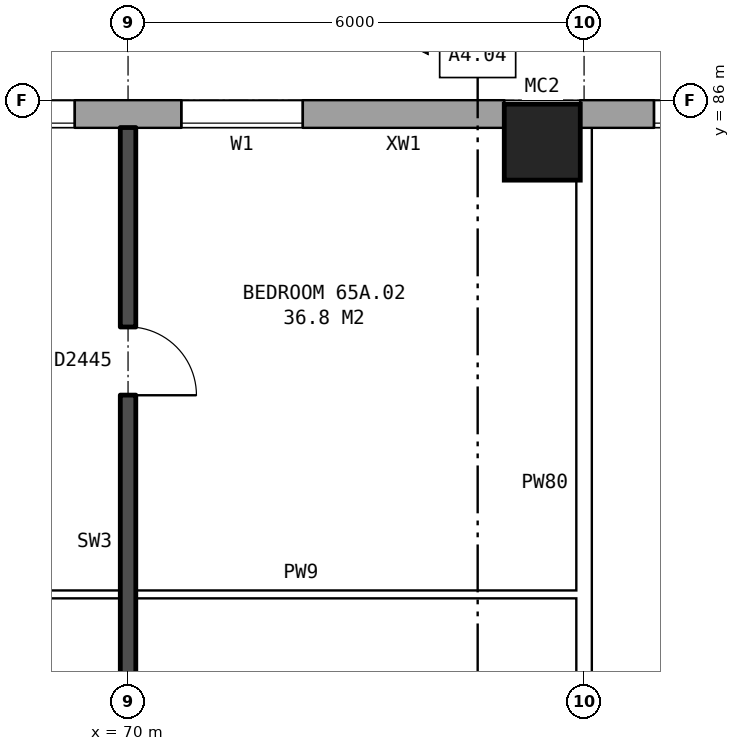
"""IFC4 building model, lengths in metres.
Left out: names, types, materials, properties, quantities, classifications, styles, units other than length and angle.
Written with IfcOpenShell. Run it as: python <this file> out.ifc"""

import sys

from ifc_helpers import new_model, si_unit, direction, frame, frame_2d, origin, origin_2d, place, context, subcontext, project, spatial, rectangle, hollow_rectangle, extrude, element, fill, save


model = new_model("IFC4")
c1 = context("Model", 3, precision=1e-05, world=origin(), true_north=direction((0.0, 1.0)))
c2 = subcontext(c1, "Body", "Model", "MODEL_VIEW")
j1 = project(units=[si_unit("LENGTHUNIT", "METRE"), si_unit("PLANEANGLEUNIT", "RADIAN")], contexts=[c1])
p1 = place(None, origin())
s1 = spatial("IfcSite", under=j1, at=p1, CompositionType="ELEMENT")
p2 = place(p1, origin())
s2 = spatial("IfcBuilding", under=s1, at=p2, CompositionType="ELEMENT")
p3 = place(p2, frame((0.0, 0.0, 230.7)))
s3 = spatial("IfcBuildingStorey", under=s2, at=p3, CompositionType="ELEMENT", Elevation=230.7)
p4 = place(p3, frame((75.45, 85.45, 0.0), z_axis=(0.0, 0.0, 1.0), x_axis=(1.0, 0.0, 0.0)))
e1 = element("IfcColumn", 1, at=p4, inside=s3, PredefinedType="COLUMN", context=c2, shape_type="SweptSolid", body=[
    extrude(hollow_rectangle(XDim=1.0, YDim=1.0, WallThickness=0.055, at=origin_2d()), origin(), (0.0, 0.0, 1.0), 3.1),
])
p5 = place(p3, frame((131.05, 85.82, 0.0), z_axis=(0.0, 0.0, 1.0), x_axis=(-1.0, 0.0, 0.0)))
e2 = element("IfcWall", 2, at=p5, inside=s3, PredefinedType="STANDARD", context=c2, shape_type="SweptSolid", body=[
    extrude(rectangle(XDim=55.1, YDim=0.36, at=frame_2d((27.55, 0.0))), origin(), (0.0, 0.0, 1.0), 2.85),
])
p6 = place(p5, frame((0.969, 0.0, 0.8)))
e3 = element("IfcOpeningElement", 3, at=p6, cuts=e2, PredefinedType="OPENING", context=c2, shape_type="SweptSolid", body=[
    extrude(rectangle(XDim=1.6, YDim=1.8, at=frame_2d((0.8, 0.9))), frame((0.0, 0.19, 0.0), z_axis=(0.0, -1.0, 0.0), x_axis=(1.0, 0.0, 0.0)), (0.0, 0.0, 1.0), 0.38),
])
p7 = place(p5, frame((4.406, 0.0, 0.8)))
e4 = element("IfcOpeningElement", 4, at=p7, cuts=e2, PredefinedType="OPENING", context=c2, shape_type="SweptSolid", body=[
    extrude(rectangle(XDim=1.6, YDim=1.8, at=frame_2d((0.8, 0.9))), frame((0.0, 0.19, 0.0), z_axis=(0.0, -1.0, 0.0), x_axis=(1.0, 0.0, 0.0)), (0.0, 0.0, 1.0), 0.38),
])
p8 = place(p5, frame((7.844, 0.0, 0.8)))
e5 = element("IfcOpeningElement", 5, at=p8, cuts=e2, PredefinedType="OPENING", context=c2, shape_type="SweptSolid", body=[
    extrude(rectangle(XDim=1.6, YDim=1.8, at=frame_2d((0.8, 0.9))), frame((0.0, 0.19, 0.0), z_axis=(0.0, -1.0, 0.0), x_axis=(1.0, 0.0, 0.0)), (0.0, 0.0, 1.0), 0.38),
])
p9 = place(p5, frame((11.281, 0.0, 0.8)))
e6 = element("IfcOpeningElement", 6, at=p9, cuts=e2, PredefinedType="OPENING", context=c2, shape_type="SweptSolid", body=[
    extrude(rectangle(XDim=1.6, YDim=1.8, at=frame_2d((0.8, 0.9))), frame((0.0, 0.19, 0.0), z_axis=(0.0, -1.0, 0.0), x_axis=(1.0, 0.0, 0.0)), (0.0, 0.0, 1.0), 0.38),
])
p10 = place(p5, frame((14.719, 0.0, 0.8)))
e7 = element("IfcOpeningElement", 7, at=p10, cuts=e2, PredefinedType="OPENING", context=c2, shape_type="SweptSolid", body=[
    extrude(rectangle(XDim=1.6, YDim=1.8, at=frame_2d((0.8, 0.9))), frame((0.0, 0.19, 0.0), z_axis=(0.0, -1.0, 0.0), x_axis=(1.0, 0.0, 0.0)), (0.0, 0.0, 1.0), 0.38),
])
p11 = place(p5, frame((18.156, 0.0, 0.8)))
e8 = element("IfcOpeningElement", 8, at=p11, cuts=e2, PredefinedType="OPENING", context=c2, shape_type="SweptSolid", body=[
    extrude(rectangle(XDim=1.6, YDim=1.8, at=frame_2d((0.8, 0.9))), frame((0.0, 0.19, 0.0), z_axis=(0.0, -1.0, 0.0), x_axis=(1.0, 0.0, 0.0)), (0.0, 0.0, 1.0), 0.38),
])
p12 = place(p5, frame((21.594, 0.0, 0.8)))
e9 = element("IfcOpeningElement", 9, at=p12, cuts=e2, PredefinedType="OPENING", context=c2, shape_type="SweptSolid", body=[
    extrude(rectangle(XDim=1.6, YDim=1.8, at=frame_2d((0.8, 0.9))), frame((0.0, 0.19, 0.0), z_axis=(0.0, -1.0, 0.0), x_axis=(1.0, 0.0, 0.0)), (0.0, 0.0, 1.0), 0.38),
])
p13 = place(p5, frame((25.031, 0.0, 0.8)))
e10 = element("IfcOpeningElement", 10, at=p13, cuts=e2, PredefinedType="OPENING", context=c2, shape_type="SweptSolid", body=[
    extrude(rectangle(XDim=1.6, YDim=1.8, at=frame_2d((0.8, 0.9))), frame((0.0, 0.19, 0.0), z_axis=(0.0, -1.0, 0.0), x_axis=(1.0, 0.0, 0.0)), (0.0, 0.0, 1.0), 0.38),
])
p14 = place(p5, frame((28.469, 0.0, 0.8)))
e11 = element("IfcOpeningElement", 11, at=p14, cuts=e2, PredefinedType="OPENING", context=c2, shape_type="SweptSolid", body=[
    extrude(rectangle(XDim=1.6, YDim=1.8, at=frame_2d((0.8, 0.9))), frame((0.0, 0.19, 0.0), z_axis=(0.0, -1.0, 0.0), x_axis=(1.0, 0.0, 0.0)), (0.0, 0.0, 1.0), 0.38),
])
p15 = place(p5, frame((31.906, 0.0, 0.8)))
e12 = element("IfcOpeningElement", 12, at=p15, cuts=e2, PredefinedType="OPENING", context=c2, shape_type="SweptSolid", body=[
    extrude(rectangle(XDim=1.6, YDim=1.8, at=frame_2d((0.8, 0.9))), frame((0.0, 0.19, 0.0), z_axis=(0.0, -1.0, 0.0), x_axis=(1.0, 0.0, 0.0)), (0.0, 0.0, 1.0), 0.38),
])
p16 = place(p5, frame((35.344, 0.0, 0.8)))
e13 = element("IfcOpeningElement", 13, at=p16, cuts=e2, PredefinedType="OPENING", context=c2, shape_type="SweptSolid", body=[
    extrude(rectangle(XDim=1.6, YDim=1.8, at=frame_2d((0.8, 0.9))), frame((0.0, 0.19, 0.0), z_axis=(0.0, -1.0, 0.0), x_axis=(1.0, 0.0, 0.0)), (0.0, 0.0, 1.0), 0.38),
])
p17 = place(p5, frame((38.781, 0.0, 0.8)))
e14 = element("IfcOpeningElement", 14, at=p17, cuts=e2, PredefinedType="OPENING", context=c2, shape_type="SweptSolid", body=[
    extrude(rectangle(XDim=1.6, YDim=1.8, at=frame_2d((0.8, 0.9))), frame((0.0, 0.19, 0.0), z_axis=(0.0, -1.0, 0.0), x_axis=(1.0, 0.0, 0.0)), (0.0, 0.0, 1.0), 0.38),
])
p18 = place(p5, frame((42.219, 0.0, 0.8)))
e15 = element("IfcOpeningElement", 15, at=p18, cuts=e2, PredefinedType="OPENING", context=c2, shape_type="SweptSolid", body=[
    extrude(rectangle(XDim=1.6, YDim=1.8, at=frame_2d((0.8, 0.9))), frame((0.0, 0.19, 0.0), z_axis=(0.0, -1.0, 0.0), x_axis=(1.0, 0.0, 0.0)), (0.0, 0.0, 1.0), 0.38),
])
p19 = place(p5, frame((45.656, 0.0, 0.8)))
e16 = element("IfcOpeningElement", 16, at=p19, cuts=e2, PredefinedType="OPENING", context=c2, shape_type="SweptSolid", body=[
    extrude(rectangle(XDim=1.6, YDim=1.8, at=frame_2d((0.8, 0.9))), frame((0.0, 0.19, 0.0), z_axis=(0.0, -1.0, 0.0), x_axis=(1.0, 0.0, 0.0)), (0.0, 0.0, 1.0), 0.38),
])
p20 = place(p5, frame((49.094, 0.0, 0.8)))
e17 = element("IfcOpeningElement", 17, at=p20, cuts=e2, PredefinedType="OPENING", context=c2, shape_type="SweptSolid", body=[
    extrude(rectangle(XDim=1.6, YDim=1.8, at=frame_2d((0.8, 0.9))), frame((0.0, 0.19, 0.0), z_axis=(0.0, -1.0, 0.0), x_axis=(1.0, 0.0, 0.0)), (0.0, 0.0, 1.0), 0.38),
])
p21 = place(p5, frame((52.531, 0.0, 0.8)))
e18 = element("IfcOpeningElement", 18, at=p21, cuts=e2, PredefinedType="OPENING", context=c2, shape_type="SweptSolid", body=[
    extrude(rectangle(XDim=1.6, YDim=1.8, at=frame_2d((0.8, 0.9))), frame((0.0, 0.19, 0.0), z_axis=(0.0, -1.0, 0.0), x_axis=(1.0, 0.0, 0.0)), (0.0, 0.0, 1.0), 0.38),
])
p22 = place(p3, frame((74.95, 85.82, 0.0), z_axis=(0.0, 0.0, 1.0), x_axis=(-1.0, 0.0, 0.0)))
e19 = element("IfcWall", 19, at=p22, inside=s3, PredefinedType="STANDARD", context=c2, shape_type="SweptSolid", body=[
    extrude(rectangle(XDim=39.875, YDim=0.36, at=frame_2d((19.938, 0.0))), origin(), (0.0, 0.0, 1.0), 2.85),
])
p23 = place(p22, frame((2.65, 0.0, 0.8)))
e20 = element("IfcOpeningElement", 20, at=p23, cuts=e19, PredefinedType="OPENING", context=c2, shape_type="SweptSolid", body=[
    extrude(rectangle(XDim=1.6, YDim=1.8, at=frame_2d((0.8, 0.9))), frame((0.0, 0.19, 0.0), z_axis=(0.0, -1.0, 0.0), x_axis=(1.0, 0.0, 0.0)), (0.0, 0.0, 1.0), 0.38),
])
p24 = place(p22, frame((5.65, 0.0, 0.8)))
e21 = element("IfcOpeningElement", 21, at=p24, cuts=e19, PredefinedType="OPENING", context=c2, shape_type="SweptSolid", body=[
    extrude(rectangle(XDim=1.6, YDim=1.8, at=frame_2d((0.8, 0.9))), frame((0.0, 0.19, 0.0), z_axis=(0.0, -1.0, 0.0), x_axis=(1.0, 0.0, 0.0)), (0.0, 0.0, 1.0), 0.38),
])
p25 = place(p22, frame((8.65, 0.0, 0.8)))
e22 = element("IfcOpeningElement", 22, at=p25, cuts=e19, PredefinedType="OPENING", context=c2, shape_type="SweptSolid", body=[
    extrude(rectangle(XDim=1.6, YDim=1.8, at=frame_2d((0.8, 0.9))), frame((0.0, 0.19, 0.0), z_axis=(0.0, -1.0, 0.0), x_axis=(1.0, 0.0, 0.0)), (0.0, 0.0, 1.0), 0.38),
])
p26 = place(p22, frame((11.65, 0.0, 0.8)))
e23 = element("IfcOpeningElement", 23, at=p26, cuts=e19, PredefinedType="OPENING", context=c2, shape_type="SweptSolid", body=[
    extrude(rectangle(XDim=1.6, YDim=1.8, at=frame_2d((0.8, 0.9))), frame((0.0, 0.19, 0.0), z_axis=(0.0, -1.0, 0.0), x_axis=(1.0, 0.0, 0.0)), (0.0, 0.0, 1.0), 0.38),
])
p27 = place(p22, frame((14.65, 0.0, 0.8)))
e24 = element("IfcOpeningElement", 24, at=p27, cuts=e19, PredefinedType="OPENING", context=c2, shape_type="SweptSolid", body=[
    extrude(rectangle(XDim=1.6, YDim=1.8, at=frame_2d((0.8, 0.9))), frame((0.0, 0.19, 0.0), z_axis=(0.0, -1.0, 0.0), x_axis=(1.0, 0.0, 0.0)), (0.0, 0.0, 1.0), 0.38),
])
p28 = place(p22, frame((17.15, 0.0, 1.7)))
e25 = element("IfcOpeningElement", 25, at=p28, cuts=e19, PredefinedType="OPENING", context=c2, shape_type="SweptSolid", body=[
    extrude(rectangle(XDim=0.6, YDim=0.9, at=frame_2d((0.3, 0.45))), frame((0.0, 0.19, 0.0), z_axis=(0.0, -1.0, 0.0), x_axis=(1.0, 0.0, 0.0)), (0.0, 0.0, 1.0), 0.38),
])
p29 = place(p22, frame((20.65, 0.0, 0.8)))
e26 = element("IfcOpeningElement", 26, at=p29, cuts=e19, PredefinedType="OPENING", context=c2, shape_type="SweptSolid", body=[
    extrude(rectangle(XDim=1.6, YDim=1.8, at=frame_2d((0.8, 0.9))), frame((0.0, 0.19, 0.0), z_axis=(0.0, -1.0, 0.0), x_axis=(1.0, 0.0, 0.0)), (0.0, 0.0, 1.0), 0.38),
])
p30 = place(p22, frame((24.7, 0.0, 0.8)))
e27 = element("IfcOpeningElement", 27, at=p30, cuts=e19, PredefinedType="OPENING", context=c2, shape_type="SweptSolid", body=[
    extrude(rectangle(XDim=1.0, YDim=1.8, at=frame_2d((0.5, 0.9))), frame((0.0, 0.19, 0.0), z_axis=(0.0, -1.0, 0.0), x_axis=(1.0, 0.0, 0.0)), (0.0, 0.0, 1.0), 0.38),
])
p31 = place(p22, frame((26.65, 0.0, 0.8)))
e28 = element("IfcOpeningElement", 28, at=p31, cuts=e19, PredefinedType="OPENING", context=c2, shape_type="SweptSolid", body=[
    extrude(rectangle(XDim=1.6, YDim=1.8, at=frame_2d((0.8, 0.9))), frame((0.0, 0.19, 0.0), z_axis=(0.0, -1.0, 0.0), x_axis=(1.0, 0.0, 0.0)), (0.0, 0.0, 1.0), 0.38),
])
p32 = place(p22, frame((29.65, 0.0, 0.8)))
e29 = element("IfcOpeningElement", 29, at=p32, cuts=e19, PredefinedType="OPENING", context=c2, shape_type="SweptSolid", body=[
    extrude(rectangle(XDim=1.6, YDim=1.8, at=frame_2d((0.8, 0.9))), frame((0.0, 0.19, 0.0), z_axis=(0.0, -1.0, 0.0), x_axis=(1.0, 0.0, 0.0)), (0.0, 0.0, 1.0), 0.38),
])
p33 = place(p22, frame((32.65, 0.0, 0.8)))
e30 = element("IfcOpeningElement", 30, at=p33, cuts=e19, PredefinedType="OPENING", context=c2, shape_type="SweptSolid", body=[
    extrude(rectangle(XDim=1.6, YDim=1.8, at=frame_2d((0.8, 0.9))), frame((0.0, 0.19, 0.0), z_axis=(0.0, -1.0, 0.0), x_axis=(1.0, 0.0, 0.0)), (0.0, 0.0, 1.0), 0.38),
])
p34 = place(p22, frame((35.65, 0.0, 0.8)))
e31 = element("IfcOpeningElement", 31, at=p34, cuts=e19, PredefinedType="OPENING", context=c2, shape_type="SweptSolid", body=[
    extrude(rectangle(XDim=1.6, YDim=1.8, at=frame_2d((0.8, 0.9))), frame((0.0, 0.19, 0.0), z_axis=(0.0, -1.0, 0.0), x_axis=(1.0, 0.0, 0.0)), (0.0, 0.0, 1.0), 0.38),
])
p35 = place(p22, frame((19.1, 0.0, 0.8)))
e32 = element("IfcOpeningElement", 32, at=p35, cuts=e19, PredefinedType="OPENING", context=c2, shape_type="SweptSolid", body=[
    extrude(rectangle(XDim=0.6, YDim=1.2, at=frame_2d((0.3, 0.6))), frame((0.0, 0.19, 0.0), z_axis=(0.0, -1.0, 0.0), x_axis=(1.0, 0.0, 0.0)), (0.0, 0.0, 1.0), 0.38),
])
p36 = place(p3, frame((64.1, 79.5, 0.0), z_axis=(0.0, 0.0, 1.0), x_axis=(1.0, 0.0, 0.0)))
e33 = element("IfcWall", 33, at=p36, inside=s3, PredefinedType="PARTITIONING", context=c2, shape_type="SweptSolid", body=[
    extrude(rectangle(XDim=11.8, YDim=0.1, at=frame_2d((5.9, 0.0))), origin(), (0.0, 0.0, 1.0), 2.85),
])
p37 = place(p36, frame((3.65, 0.0, 0.0)))
e34 = element("IfcOpeningElement", 34, at=p37, cuts=e33, PredefinedType="OPENING", context=c2, shape_type="SweptSolid", body=[
    extrude(rectangle(XDim=0.9, YDim=2.1, at=frame_2d((0.45, 1.05))), frame((0.0, 0.06, 0.0), z_axis=(0.0, -1.0, 0.0), x_axis=(1.0, 0.0, 0.0)), (0.0, 0.0, 1.0), 0.12),
])
p38 = place(p36, frame((0.7, 0.0, 0.0)))
e35 = element("IfcOpeningElement", 35, at=p38, cuts=e33, PredefinedType="OPENING", context=c2, shape_type="SweptSolid", body=[
    extrude(rectangle(XDim=0.9, YDim=2.1, at=frame_2d((0.45, 1.05))), frame((0.0, 0.06, 0.0), z_axis=(0.0, -1.0, 0.0), x_axis=(1.0, 0.0, 0.0)), (0.0, 0.0, 1.0), 0.12),
])
p39 = place(p3, frame((70.0, 76.2, 0.0), z_axis=(0.0, 0.0, 1.0), x_axis=(0.0, 1.0, 0.0)))
e36 = element("IfcWall", 36, at=p39, inside=s3, PredefinedType="SOLIDWALL", context=c2, shape_type="SweptSolid", body=[
    extrude(rectangle(XDim=9.44, YDim=0.2, at=frame_2d((4.72, 0.0))), origin(), (0.0, 0.0, 1.0), 2.85),
])
p40 = place(p39, frame((5.92, 0.0, 0.0)))
e37 = element("IfcOpeningElement", 37, at=p40, cuts=e36, PredefinedType="OPENING", context=c2, shape_type="SweptSolid", body=[
    extrude(rectangle(XDim=0.9, YDim=2.1, at=frame_2d((0.45, 1.05))), frame((0.0, 0.11, 0.0), z_axis=(0.0, -1.0, 0.0), x_axis=(1.0, 0.0, 0.0)), (0.0, 0.0, 1.0), 0.22),
])
p41 = place(p39, frame((1.25, 0.0, 0.0)))
e38 = element("IfcOpeningElement", 38, at=p41, cuts=e36, PredefinedType="OPENING", context=c2, shape_type="SweptSolid", body=[
    extrude(rectangle(XDim=0.8, YDim=2.1, at=frame_2d((0.4, 1.05))), frame((0.0, 0.11, 0.0), z_axis=(0.0, -1.0, 0.0), x_axis=(1.0, 0.0, 0.0)), (0.0, 0.0, 1.0), 0.22),
])
p42 = place(p3, frame((76.0, 76.3, 0.0), z_axis=(0.0, 0.0, 1.0), x_axis=(0.0, 1.0, 0.0)))
e39 = element("IfcWall", 39, at=p42, inside=s3, PredefinedType="PARTITIONING", context=c2, shape_type="SweptSolid", body=[
    extrude(rectangle(XDim=9.34, YDim=0.2, at=frame_2d((4.67, 0.0))), origin(), (0.0, 0.0, 1.0), 2.85),
])
p43 = place(p21, origin())
e40 = element("IfcWindow", 40, at=p43, inside=s3, PartitioningType="SINGLE_PANEL", PredefinedType="WINDOW", context=c2, shape_type="SweptSolid", body=[
    extrude(rectangle(XDim=1.6, YDim=1.8, at=frame_2d((0.8, 0.9))), frame((0.0, 0.15, 0.0), z_axis=(0.0, -1.0, 0.0), x_axis=(1.0, 0.0, 0.0)), (0.0, 0.0, 1.0), 0.06),
])
fill(e18, e40)
p44 = place(p23, origin())
e41 = element("IfcWindow", 41, at=p44, inside=s3, PartitioningType="SINGLE_PANEL", PredefinedType="WINDOW", context=c2, shape_type="SweptSolid", body=[
    extrude(rectangle(XDim=1.6, YDim=1.8, at=frame_2d((0.8, 0.9))), frame((0.0, 0.15, 0.0), z_axis=(0.0, -1.0, 0.0), x_axis=(1.0, 0.0, 0.0)), (0.0, 0.0, 1.0), 0.06),
])
fill(e20, e41)
p45 = place(p24, origin())
e42 = element("IfcWindow", 42, at=p45, inside=s3, PartitioningType="SINGLE_PANEL", PredefinedType="WINDOW", context=c2, shape_type="SweptSolid", body=[
    extrude(rectangle(XDim=1.6, YDim=1.8, at=frame_2d((0.8, 0.9))), frame((0.0, 0.15, 0.0), z_axis=(0.0, -1.0, 0.0), x_axis=(1.0, 0.0, 0.0)), (0.0, 0.0, 1.0), 0.06),
])
fill(e21, e42)
p46 = place(p40, frame((0.9, 0.0, 0.0), z_axis=(0.0, 0.0, 1.0), x_axis=(-1.0, 0.0, 0.0)))
e43 = element("IfcDoor", 43, at=p46, inside=s3, OperationType="SINGLE_SWING_RIGHT", PredefinedType="DOOR", context=c2, shape_type="SweptSolid", body=[
    extrude(rectangle(XDim=0.9, YDim=2.1, at=frame_2d((0.45, 1.05))), frame((0.0, 0.025, 0.0), z_axis=(0.0, -1.0, 0.0), x_axis=(1.0, 0.0, 0.0)), (0.0, 0.0, 1.0), 0.05),
])
fill(e37, e43)
save(model, sys.argv[1])
